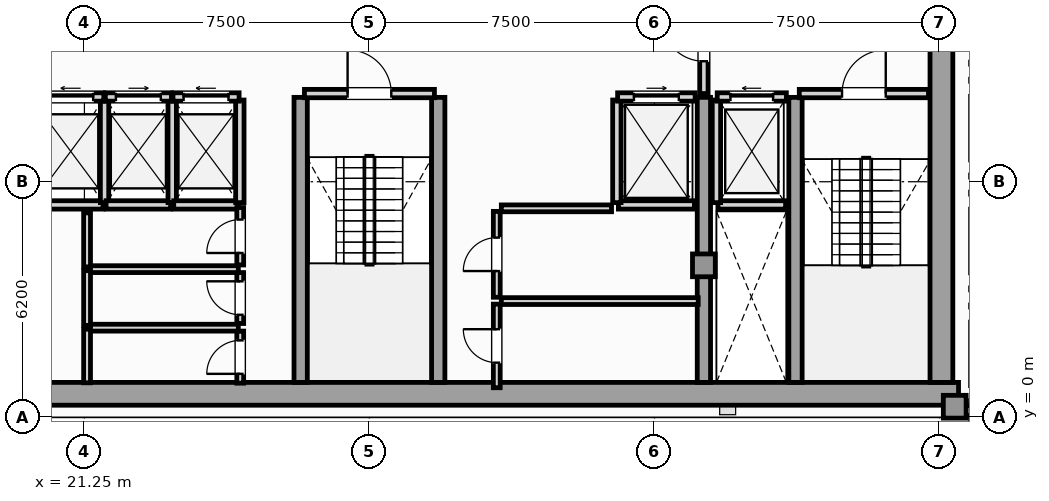
"""IFC4 building model, lengths in metres.
Left out: names, types, materials, properties, quantities, classifications, styles, units other than length and angle.
Written with IfcOpenShell. Run it as: python <this file> out.ifc"""

import sys

from ifc_helpers import new_model, si_unit, direction, frame, frame_2d, origin, origin_2d, place, context, subcontext, project, spatial, rectangle, extrude, element, fill, save


model = new_model("IFC4")
c1 = context("Model", 3, precision=1e-05, world=origin(), true_north=direction((0.0, 1.0)))
c2 = subcontext(c1, "Body", "Model", "MODEL_VIEW")
j1 = project(units=[si_unit("LENGTHUNIT", "METRE"), si_unit("PLANEANGLEUNIT", "RADIAN")], contexts=[c1])
p1 = place(None, origin())
s1 = spatial("IfcSite", under=j1, at=p1, CompositionType="ELEMENT")
p2 = place(p1, origin())
s2 = spatial("IfcBuilding", under=s1, at=p2, CompositionType="ELEMENT")
p3 = place(p2, frame((0.0, 0.0, 292.6)))
s3 = spatial("IfcBuildingStorey", under=s2, at=p3, CompositionType="ELEMENT", Elevation=292.6)
p4 = place(p3, frame((13.25, 0.62, 0.0), z_axis=(0.0, 0.0, 1.0), x_axis=(1.0, 0.0, 0.0)))
e1 = element("IfcWall", 1, at=p4, inside=s3, PredefinedType="SHEAR", context=c2, shape_type="SweptSolid", body=[
    extrude(rectangle(XDim=31.0, YDim=0.6, at=frame_2d((15.5, 0.0))), origin(), (0.0, 0.0, 1.0), 3.65),
])
p5 = place(p3, frame((43.8, 0.92, 0.0), z_axis=(0.0, 0.0, 1.0), x_axis=(0.0, 1.0, 0.0)))
e2 = element("IfcWall", 2, at=p5, inside=s3, PredefinedType="SHEAR", context=c2, shape_type="SweptSolid", body=[
    extrude(rectangle(XDim=10.53, YDim=0.6, at=frame_2d((5.265, 0.0))), origin(), (0.0, 0.0, 1.0), 3.65),
])
for number, where, z_axis, x_axis in (
    (3, (26.94, 0.92, 0.0), (0.0, 0.0, 1.0), (0.0, 1.0, 0.0)),
    (4, (30.56, 0.92, 0.0), (0.0, 0.0, 1.0), (0.0, 1.0, 0.0)),
    (5, (37.55, 0.92, 0.0), (0.0, 0.0, 1.0), (0.0, 1.0, 0.0)),
    (6, (39.96, 0.92, 0.0), (0.0, 0.0, 1.0), (0.0, 1.0, 0.0)),
):
    element("IfcWall", number, at=place(p3, frame(where, z_axis=z_axis, x_axis=x_axis)), inside=s3, PredefinedType="SHEAR", context=c2, shape_type="SweptSolid", body=[
        extrude(rectangle(XDim=7.5, YDim=0.35, at=frame_2d((3.75, 0.0))), origin(), (0.0, 0.0, 1.0), 3.65),
    ])
for number, where, z_axis, x_axis in (
    (7, (44.15, 0.28, 0.0), (0.0, 0.0, 1.0), (1.0, 0.0, 0.0)),
    (8, (37.55, 4.0, 0.0), (0.0, 0.0, 1.0), (1.0, 0.0, 0.0)),
):
    element("IfcColumn", number, at=place(p3, frame(where, z_axis=z_axis, x_axis=x_axis)), inside=s3, PredefinedType="COLUMN", context=c2, shape_type="SweptSolid", body=[
        extrude(rectangle(XDim=0.6, YDim=0.6, at=origin_2d()), origin(), (0.0, 0.0, 1.0), 3.85),
    ])
p6 = place(p3, frame((44.25, 0.18, 0.0), z_axis=(0.0, 0.0, 1.0), x_axis=(1.0, 0.0, 0.0)))
e9 = element("IfcWall", 9, at=p6, inside=s3, PredefinedType="SOLIDWALL", context=c2, shape_type="SweptSolid", body=[
    extrude(rectangle(XDim=1.444, YDim=0.26, at=frame_2d((0.722, 0.0))), origin(), (0.0, 0.0, 1.0), 3.65),
])
p7 = place(p3, frame((37.92, 5.59, 0.0), z_axis=(0.0, 0.0, 1.0), x_axis=(1.0, 0.0, 0.0)))
e10 = element("IfcWall", 10, at=p7, inside=s3, PredefinedType="SOLIDWALL", context=c2, shape_type="SweptSolid", body=[
    extrude(rectangle(XDim=1.78, YDim=0.22, at=frame_2d((0.89, 0.0))), origin(), (0.0, 0.0, 1.0), 3.65),
])
p8 = place(p3, frame((37.88, 5.65, 0.0), z_axis=(0.0, 0.0, 1.0), x_axis=(0.0, 1.0, 0.0)))
e11 = element("IfcWall", 11, at=p8, inside=s3, PredefinedType="SOLIDWALL", context=c2, shape_type="SweptSolid", body=[
    extrude(rectangle(XDim=2.7, YDim=0.22, at=frame_2d((1.35, 0.0))), origin(), (0.0, 0.0, 1.0), 3.65),
])
p9 = place(p3, frame((37.9, 8.43, 0.0), z_axis=(0.0, 0.0, 1.0), x_axis=(1.0, 0.0, 0.0)))
e12 = element("IfcWall", 12, at=p9, inside=s3, PredefinedType="SOLIDWALL", context=c2, shape_type="SweptSolid", body=[
    extrude(rectangle(XDim=1.82, YDim=0.22, at=frame_2d((0.91, 0.0))), origin(), (0.0, 0.0, 1.0), 3.65),
])
p10 = place(p9, frame((0.35, 0.0, 0.0)))
e13 = element("IfcOpeningElement", 13, at=p10, cuts=e12, PredefinedType="OPENING", context=c2, shape_type="SweptSolid", body=[
    extrude(rectangle(XDim=1.12, YDim=2.25, at=frame_2d((0.56, 1.125))), frame((0.0, 0.12, 0.0), z_axis=(0.0, -1.0, 0.0), x_axis=(1.0, 0.0, 0.0)), (0.0, 0.0, 1.0), 0.24),
])
p11 = place(p3, frame((35.3, 5.59, 0.0), z_axis=(0.0, 0.0, 1.0), x_axis=(1.0, 0.0, 0.0)))
e14 = element("IfcWall", 14, at=p11, inside=s3, PredefinedType="SOLIDWALL", context=c2, shape_type="SweptSolid", body=[
    extrude(rectangle(XDim=2.0, YDim=0.22, at=frame_2d((1.0, 0.0))), origin(), (0.0, 0.0, 1.0), 3.65),
])
p12 = place(p3, frame((35.26, 5.65, 0.0), z_axis=(0.0, 0.0, 1.0), x_axis=(0.0, 1.0, 0.0)))
e15 = element("IfcWall", 15, at=p12, inside=s3, PredefinedType="SOLIDWALL", context=c2, shape_type="SweptSolid", body=[
    extrude(rectangle(XDim=2.7, YDim=0.22, at=frame_2d((1.35, 0.0))), origin(), (0.0, 0.0, 1.0), 3.65),
])
p13 = place(p3, frame((35.28, 8.43, 0.0), z_axis=(0.0, 0.0, 1.0), x_axis=(1.0, 0.0, 0.0)))
e16 = element("IfcWall", 16, at=p13, inside=s3, PredefinedType="SOLIDWALL", context=c2, shape_type="SweptSolid", body=[
    extrude(rectangle(XDim=2.04, YDim=0.22, at=frame_2d((1.02, 0.0))), origin(), (0.0, 0.0, 1.0), 3.65),
])
p14 = place(p13, frame((0.43, 0.0, 0.0)))
e17 = element("IfcOpeningElement", 17, at=p14, cuts=e16, PredefinedType="OPENING", context=c2, shape_type="SweptSolid", body=[
    extrude(rectangle(XDim=1.18, YDim=2.2, at=frame_2d((0.59, 1.1))), frame((0.0, 0.12, 0.0), z_axis=(0.0, -1.0, 0.0), x_axis=(1.0, 0.0, 0.0)), (0.0, 0.0, 1.0), 0.24),
])
p15 = place(p3, frame((20.04, 5.59, 0.0), z_axis=(0.0, 0.0, 1.0), x_axis=(1.0, 0.0, 0.0)))
e18 = element("IfcWall", 18, at=p15, inside=s3, PredefinedType="SOLIDWALL", context=c2, shape_type="SweptSolid", body=[
    extrude(rectangle(XDim=1.7, YDim=0.22, at=frame_2d((0.85, 0.0))), origin(), (0.0, 0.0, 1.0), 3.65),
])
p16 = place(p3, frame((21.78, 5.65, 0.0), z_axis=(0.0, 0.0, 1.0), x_axis=(0.0, 1.0, 0.0)))
e19 = element("IfcWall", 19, at=p16, inside=s3, PredefinedType="SOLIDWALL", context=c2, shape_type="SweptSolid", body=[
    extrude(rectangle(XDim=2.7, YDim=0.22, at=frame_2d((1.35, 0.0))), origin(), (0.0, 0.0, 1.0), 3.65),
])
p17 = place(p3, frame((20.02, 8.43, 0.0), z_axis=(0.0, 0.0, 1.0), x_axis=(1.0, 0.0, 0.0)))
e20 = element("IfcWall", 20, at=p17, inside=s3, PredefinedType="SOLIDWALL", context=c2, shape_type="SweptSolid", body=[
    extrude(rectangle(XDim=1.74, YDim=0.22, at=frame_2d((0.87, 0.0))), origin(), (0.0, 0.0, 1.0), 3.65),
])
p18 = place(p17, frame((0.28, 0.0, 0.0)))
e21 = element("IfcOpeningElement", 21, at=p18, cuts=e20, PredefinedType="OPENING", context=c2, shape_type="SweptSolid", body=[
    extrude(rectangle(XDim=1.18, YDim=2.2, at=frame_2d((0.59, 1.1))), frame((0.0, 0.12, 0.0), z_axis=(0.0, -1.0, 0.0), x_axis=(1.0, 0.0, 0.0)), (0.0, 0.0, 1.0), 0.24),
])
p19 = place(p3, frame((21.82, 5.59, 0.0), z_axis=(0.0, 0.0, 1.0), x_axis=(1.0, 0.0, 0.0)))
e22 = element("IfcWall", 22, at=p19, inside=s3, PredefinedType="SOLIDWALL", context=c2, shape_type="SweptSolid", body=[
    extrude(rectangle(XDim=1.7, YDim=0.22, at=frame_2d((0.85, 0.0))), origin(), (0.0, 0.0, 1.0), 3.65),
])
p20 = place(p3, frame((23.56, 5.65, 0.0), z_axis=(0.0, 0.0, 1.0), x_axis=(0.0, 1.0, 0.0)))
e23 = element("IfcWall", 23, at=p20, inside=s3, PredefinedType="SOLIDWALL", context=c2, shape_type="SweptSolid", body=[
    extrude(rectangle(XDim=2.7, YDim=0.22, at=frame_2d((1.35, 0.0))), origin(), (0.0, 0.0, 1.0), 3.65),
])
p21 = place(p3, frame((21.8, 8.43, 0.0), z_axis=(0.0, 0.0, 1.0), x_axis=(1.0, 0.0, 0.0)))
e24 = element("IfcWall", 24, at=p21, inside=s3, PredefinedType="SOLIDWALL", context=c2, shape_type="SweptSolid", body=[
    extrude(rectangle(XDim=1.74, YDim=0.22, at=frame_2d((0.87, 0.0))), origin(), (0.0, 0.0, 1.0), 3.65),
])
p22 = place(p21, frame((0.28, 0.0, 0.0)))
e25 = element("IfcOpeningElement", 25, at=p22, cuts=e24, PredefinedType="OPENING", context=c2, shape_type="SweptSolid", body=[
    extrude(rectangle(XDim=1.18, YDim=2.2, at=frame_2d((0.59, 1.1))), frame((0.0, 0.12, 0.0), z_axis=(0.0, -1.0, 0.0), x_axis=(1.0, 0.0, 0.0)), (0.0, 0.0, 1.0), 0.24),
])
p23 = place(p3, frame((23.6, 5.59, 0.0), z_axis=(0.0, 0.0, 1.0), x_axis=(1.0, 0.0, 0.0)))
e26 = element("IfcWall", 26, at=p23, inside=s3, PredefinedType="SOLIDWALL", context=c2, shape_type="SweptSolid", body=[
    extrude(rectangle(XDim=1.7, YDim=0.22, at=frame_2d((0.85, 0.0))), origin(), (0.0, 0.0, 1.0), 3.65),
])
p24 = place(p3, frame((25.34, 5.65, 0.0), z_axis=(0.0, 0.0, 1.0), x_axis=(0.0, 1.0, 0.0)))
e27 = element("IfcWall", 27, at=p24, inside=s3, PredefinedType="SOLIDWALL", context=c2, shape_type="SweptSolid", body=[
    extrude(rectangle(XDim=2.7, YDim=0.22, at=frame_2d((1.35, 0.0))), origin(), (0.0, 0.0, 1.0), 3.65),
])
p25 = place(p3, frame((23.58, 8.43, 0.0), z_axis=(0.0, 0.0, 1.0), x_axis=(1.0, 0.0, 0.0)))
e28 = element("IfcWall", 28, at=p25, inside=s3, PredefinedType="SOLIDWALL", context=c2, shape_type="SweptSolid", body=[
    extrude(rectangle(XDim=1.74, YDim=0.22, at=frame_2d((0.87, 0.0))), origin(), (0.0, 0.0, 1.0), 3.65),
])
p26 = place(p25, frame((0.28, 0.0, 0.0)))
e29 = element("IfcOpeningElement", 29, at=p26, cuts=e28, PredefinedType="OPENING", context=c2, shape_type="SweptSolid", body=[
    extrude(rectangle(XDim=1.18, YDim=2.2, at=frame_2d((0.59, 1.1))), frame((0.0, 0.12, 0.0), z_axis=(0.0, -1.0, 0.0), x_axis=(1.0, 0.0, 0.0)), (0.0, 0.0, 1.0), 0.24),
])
p27 = place(p3, frame((40.06, 8.52, 0.0), z_axis=(0.0, 0.0, 1.0), x_axis=(1.0, 0.0, 0.0)))
e30 = element("IfcWall", 30, at=p27, inside=s3, PredefinedType="SOLIDWALL", context=c2, shape_type="SweptSolid", body=[
    extrude(rectangle(XDim=3.4, YDim=0.22, at=frame_2d((1.7, 0.0))), origin(), (0.0, 0.0, 1.0), 3.65),
])
p28 = place(p27, frame((1.125, 0.0, 0.0)))
e31 = element("IfcOpeningElement", 31, at=p28, cuts=e30, PredefinedType="OPENING", context=c2, shape_type="SweptSolid", body=[
    extrude(rectangle(XDim=1.15, YDim=2.2, at=frame_2d((0.575, 1.1))), frame((0.0, 0.12, 0.0), z_axis=(0.0, -1.0, 0.0), x_axis=(1.0, 0.0, 0.0)), (0.0, 0.0, 1.0), 0.24),
])
p29 = place(p3, frame((27.04, 8.52, 0.0), z_axis=(0.0, 0.0, 1.0), x_axis=(1.0, 0.0, 0.0)))
e32 = element("IfcWall", 32, at=p29, inside=s3, PredefinedType="SOLIDWALL", context=c2, shape_type="SweptSolid", body=[
    extrude(rectangle(XDim=3.42, YDim=0.22, at=frame_2d((1.71, 0.0))), origin(), (0.0, 0.0, 1.0), 3.65),
])
p30 = place(p29, frame((1.135, 0.0, 0.0)))
e33 = element("IfcOpeningElement", 33, at=p30, cuts=e32, PredefinedType="OPENING", context=c2, shape_type="SweptSolid", body=[
    extrude(rectangle(XDim=1.15, YDim=2.2, at=frame_2d((0.575, 1.1))), frame((0.0, 0.12, 0.0), z_axis=(0.0, -1.0, 0.0), x_axis=(1.0, 0.0, 0.0)), (0.0, 0.0, 1.0), 0.24),
])
p31 = place(p3, frame((37.55, 8.52, 0.0), z_axis=(0.0, 0.0, 1.0), x_axis=(0.0, 1.0, 0.0)))
e34 = element("IfcWall", 34, at=p31, inside=s3, PredefinedType="SOLIDWALL", context=c2, shape_type="SweptSolid", body=[
    extrude(rectangle(XDim=2.8, YDim=0.22, at=frame_2d((1.4, 0.0))), origin(), (0.0, 0.0, 1.0), 3.105),
])
p32 = place(p31, frame((0.85, 0.0, 0.0)))
e35 = element("IfcOpeningElement", 35, at=p32, cuts=e34, PredefinedType="OPENING", context=c2, shape_type="SweptSolid", body=[
    extrude(rectangle(XDim=1.1, YDim=2.2, at=frame_2d((0.55, 1.1))), frame((0.0, 0.12, 0.0), z_axis=(0.0, -1.0, 0.0), x_axis=(1.0, 0.0, 0.0)), (0.0, 0.0, 1.0), 0.24),
])
p33 = place(p3, frame((25.35, 0.9, 0.0), z_axis=(0.0, 0.0, 1.0), x_axis=(0.0, 1.0, 0.0)))
e36 = element("IfcWall", 36, at=p33, inside=s3, PredefinedType="PARTITIONING", context=c2, shape_type="SweptSolid", body=[
    extrude(rectangle(XDim=1.37, YDim=0.18, at=frame_2d((0.685, 0.0))), origin(), (0.0, 0.0, 1.0), 3.65),
])
p34 = place(p33, frame((0.245, 0.0, 0.0)))
e37 = element("IfcOpeningElement", 37, at=p34, cuts=e36, PredefinedType="OPENING", context=c2, shape_type="SweptSolid", body=[
    extrude(rectangle(XDim=0.88, YDim=2.05, at=frame_2d((0.44, 1.025))), frame((0.0, 0.1, 0.0), z_axis=(0.0, -1.0, 0.0), x_axis=(1.0, 0.0, 0.0)), (0.0, 0.0, 1.0), 0.2),
])
p35 = place(p3, frame((21.36, 2.36, 0.0), z_axis=(0.0, 0.0, 1.0), x_axis=(1.0, 0.0, 0.0)))
e38 = element("IfcWall", 38, at=p35, inside=s3, PredefinedType="PARTITIONING", context=c2, shape_type="SweptSolid", body=[
    extrude(rectangle(XDim=3.94, YDim=0.18, at=frame_2d((1.97, 0.0))), origin(), (0.0, 0.0, 1.0), 3.65),
])
p36 = place(p3, frame((21.32, 0.91, 0.0), z_axis=(0.0, 0.0, 1.0), x_axis=(0.0, 1.0, 0.0)))
e39 = element("IfcWall", 39, at=p36, inside=s3, PredefinedType="PARTITIONING", context=c2, shape_type="SweptSolid", body=[
    extrude(rectangle(XDim=1.41, YDim=0.18, at=frame_2d((0.705, 0.0))), origin(), (0.0, 0.0, 1.0), 3.65),
])
p37 = place(p3, frame((25.35, 2.47, 0.0), z_axis=(0.0, 0.0, 1.0), x_axis=(0.0, 1.0, 0.0)))
e40 = element("IfcWall", 40, at=p37, inside=s3, PredefinedType="PARTITIONING", context=c2, shape_type="SweptSolid", body=[
    extrude(rectangle(XDim=1.34, YDim=0.18, at=frame_2d((0.67, 0.0))), origin(), (0.0, 0.0, 1.0), 3.65),
])
p38 = place(p37, frame((0.23, 0.0, 0.0)))
e41 = element("IfcOpeningElement", 41, at=p38, cuts=e40, PredefinedType="OPENING", context=c2, shape_type="SweptSolid", body=[
    extrude(rectangle(XDim=0.88, YDim=2.05, at=frame_2d((0.44, 1.025))), frame((0.0, 0.1, 0.0), z_axis=(0.0, -1.0, 0.0), x_axis=(1.0, 0.0, 0.0)), (0.0, 0.0, 1.0), 0.2),
])
p39 = place(p3, frame((21.36, 3.9, 0.0), z_axis=(0.0, 0.0, 1.0), x_axis=(1.0, 0.0, 0.0)))
e42 = element("IfcWall", 42, at=p39, inside=s3, PredefinedType="PARTITIONING", context=c2, shape_type="SweptSolid", body=[
    extrude(rectangle(XDim=3.94, YDim=0.18, at=frame_2d((1.97, 0.0))), origin(), (0.0, 0.0, 1.0), 3.65),
])
p40 = place(p3, frame((21.32, 2.42, 0.0), z_axis=(0.0, 0.0, 1.0), x_axis=(0.0, 1.0, 0.0)))
e43 = element("IfcWall", 43, at=p40, inside=s3, PredefinedType="PARTITIONING", context=c2, shape_type="SweptSolid", body=[
    extrude(rectangle(XDim=1.44, YDim=0.18, at=frame_2d((0.72, 0.0))), origin(), (0.0, 0.0, 1.0), 3.65),
])
p41 = place(p3, frame((25.35, 4.01, 0.0), z_axis=(0.0, 0.0, 1.0), x_axis=(0.0, 1.0, 0.0)))
e44 = element("IfcWall", 44, at=p41, inside=s3, PredefinedType="PARTITIONING", context=c2, shape_type="SweptSolid", body=[
    extrude(rectangle(XDim=1.51, YDim=0.18, at=frame_2d((0.755, 0.0))), origin(), (0.0, 0.0, 1.0), 3.65),
])
p42 = place(p41, frame((0.315, 0.0, 0.0)))
e45 = element("IfcOpeningElement", 45, at=p42, cuts=e44, PredefinedType="OPENING", context=c2, shape_type="SweptSolid", body=[
    extrude(rectangle(XDim=0.88, YDim=2.05, at=frame_2d((0.44, 1.025))), frame((0.0, 0.1, 0.0), z_axis=(0.0, -1.0, 0.0), x_axis=(1.0, 0.0, 0.0)), (0.0, 0.0, 1.0), 0.2),
])
p43 = place(p3, frame((21.32, 3.96, 0.0), z_axis=(0.0, 0.0, 1.0), x_axis=(0.0, 1.0, 0.0)))
e46 = element("IfcWall", 46, at=p43, inside=s3, PredefinedType="PARTITIONING", context=c2, shape_type="SweptSolid", body=[
    extrude(rectangle(XDim=1.42, YDim=0.18, at=frame_2d((0.71, 0.0))), origin(), (0.0, 0.0, 1.0), 3.65),
])
p44 = place(p3, frame((32.1, 0.78, 0.0), z_axis=(0.0, 0.0, 1.0), x_axis=(0.0, 1.0, 0.0)))
e47 = element("IfcWall", 47, at=p44, inside=s3, PredefinedType="PARTITIONING", context=c2, shape_type="SweptSolid", body=[
    extrude(rectangle(XDim=2.2, YDim=0.18, at=frame_2d((1.1, 0.0))), origin(), (0.0, 0.0, 1.0), 3.65),
])
p45 = place(p44, frame((0.66, 0.0, 0.0)))
e48 = element("IfcOpeningElement", 48, at=p45, cuts=e47, PredefinedType="OPENING", context=c2, shape_type="SweptSolid", body=[
    extrude(rectangle(XDim=0.88, YDim=2.05, at=frame_2d((0.44, 1.025))), frame((0.0, 0.1, 0.0), z_axis=(0.0, -1.0, 0.0), x_axis=(1.0, 0.0, 0.0)), (0.0, 0.0, 1.0), 0.2),
])
p46 = place(p3, frame((32.22, 3.06, 0.0), z_axis=(0.0, 0.0, 1.0), x_axis=(1.0, 0.0, 0.0)))
e49 = element("IfcWall", 49, at=p46, inside=s3, PredefinedType="PARTITIONING", context=c2, shape_type="SweptSolid", body=[
    extrude(rectangle(XDim=5.18, YDim=0.18, at=frame_2d((2.59, 0.0))), origin(), (0.0, 0.0, 1.0), 3.65),
])
p47 = place(p3, frame((32.1, 3.16, 0.0), z_axis=(0.0, 0.0, 1.0), x_axis=(0.0, 1.0, 0.0)))
e50 = element("IfcWall", 50, at=p47, inside=s3, PredefinedType="PARTITIONING", context=c2, shape_type="SweptSolid", body=[
    extrude(rectangle(XDim=2.26, YDim=0.18, at=frame_2d((1.13, 0.0))), origin(), (0.0, 0.0, 1.0), 3.65),
])
p48 = place(p47, frame((0.69, 0.0, 0.0)))
e51 = element("IfcOpeningElement", 51, at=p48, cuts=e50, PredefinedType="OPENING", context=c2, shape_type="SweptSolid", body=[
    extrude(rectangle(XDim=0.88, YDim=2.05, at=frame_2d((0.44, 1.025))), frame((0.0, 0.1, 0.0), z_axis=(0.0, -1.0, 0.0), x_axis=(1.0, 0.0, 0.0)), (0.0, 0.0, 1.0), 0.2),
])
p49 = place(p3, frame((32.22, 5.5, 0.0), z_axis=(0.0, 0.0, 1.0), x_axis=(1.0, 0.0, 0.0)))
e52 = element("IfcWall", 52, at=p49, inside=s3, PredefinedType="PARTITIONING", context=c2, shape_type="SweptSolid", body=[
    extrude(rectangle(XDim=2.9, YDim=0.18, at=frame_2d((1.45, 0.0))), origin(), (0.0, 0.0, 1.0), 3.65),
])
p50 = place(p10, origin())
e53 = element("IfcDoor", 53, at=p50, inside=s3, OperationType="SLIDING_TO_LEFT", PredefinedType="DOOR", context=c2, shape_type="SweptSolid", body=[
    extrude(rectangle(XDim=1.12, YDim=2.25, at=frame_2d((0.56, 1.125))), frame((0.0, 0.025, 0.0), z_axis=(0.0, -1.0, 0.0), x_axis=(1.0, 0.0, 0.0)), (0.0, 0.0, 1.0), 0.05),
])
fill(e13, e53)
p51 = place(p14, origin())
e54 = element("IfcDoor", 54, at=p51, inside=s3, OperationType="SLIDING_TO_RIGHT", PredefinedType="DOOR", context=c2, shape_type="SweptSolid", body=[
    extrude(rectangle(XDim=1.18, YDim=2.2, at=frame_2d((0.59, 1.1))), frame((0.0, 0.025, 0.0), z_axis=(0.0, -1.0, 0.0), x_axis=(1.0, 0.0, 0.0)), (0.0, 0.0, 1.0), 0.05),
])
fill(e17, e54)
p52 = place(p18, origin())
e55 = element("IfcDoor", 55, at=p52, inside=s3, OperationType="SLIDING_TO_LEFT", PredefinedType="DOOR", context=c2, shape_type="SweptSolid", body=[
    extrude(rectangle(XDim=1.18, YDim=2.2, at=frame_2d((0.59, 1.1))), frame((0.0, 0.025, 0.0), z_axis=(0.0, -1.0, 0.0), x_axis=(1.0, 0.0, 0.0)), (0.0, 0.0, 1.0), 0.05),
])
fill(e21, e55)
p53 = place(p22, origin())
e56 = element("IfcDoor", 56, at=p53, inside=s3, OperationType="SLIDING_TO_RIGHT", PredefinedType="DOOR", context=c2, shape_type="SweptSolid", body=[
    extrude(rectangle(XDim=1.18, YDim=2.2, at=frame_2d((0.59, 1.1))), frame((0.0, 0.025, 0.0), z_axis=(0.0, -1.0, 0.0), x_axis=(1.0, 0.0, 0.0)), (0.0, 0.0, 1.0), 0.05),
])
fill(e25, e56)
p54 = place(p26, origin())
e57 = element("IfcDoor", 57, at=p54, inside=s3, OperationType="SLIDING_TO_LEFT", PredefinedType="DOOR", context=c2, shape_type="SweptSolid", body=[
    extrude(rectangle(XDim=1.18, YDim=2.2, at=frame_2d((0.59, 1.1))), frame((0.0, 0.025, 0.0), z_axis=(0.0, -1.0, 0.0), x_axis=(1.0, 0.0, 0.0)), (0.0, 0.0, 1.0), 0.05),
])
fill(e29, e57)
p55 = place(p28, origin())
e58 = element("IfcDoor", 58, at=p55, inside=s3, OperationType="SINGLE_SWING_RIGHT", PredefinedType="DOOR", context=c2, shape_type="SweptSolid", body=[
    extrude(rectangle(XDim=1.15, YDim=2.2, at=frame_2d((0.575, 1.1))), frame((0.0, 0.025, 0.0), z_axis=(0.0, -1.0, 0.0), x_axis=(1.0, 0.0, 0.0)), (0.0, 0.0, 1.0), 0.05),
])
fill(e31, e58)
p56 = place(p30, origin())
e59 = element("IfcDoor", 59, at=p56, inside=s3, OperationType="SINGLE_SWING_LEFT", PredefinedType="DOOR", context=c2, shape_type="SweptSolid", body=[
    extrude(rectangle(XDim=1.15, YDim=2.2, at=frame_2d((0.575, 1.1))), frame((0.0, 0.025, 0.0), z_axis=(0.0, -1.0, 0.0), x_axis=(1.0, 0.0, 0.0)), (0.0, 0.0, 1.0), 0.05),
])
fill(e33, e59)
p57 = place(p32, origin())
e60 = element("IfcDoor", 60, at=p57, inside=s3, OperationType="SINGLE_SWING_RIGHT", PredefinedType="DOOR", context=c2, shape_type="SweptSolid", body=[
    extrude(rectangle(XDim=1.1, YDim=2.2, at=frame_2d((0.55, 1.1))), frame((0.0, 0.025, 0.0), z_axis=(0.0, -1.0, 0.0), x_axis=(1.0, 0.0, 0.0)), (0.0, 0.0, 1.0), 0.05),
])
fill(e35, e60)
p58 = place(p34, origin())
e61 = element("IfcDoor", 61, at=p58, inside=s3, OperationType="SINGLE_SWING_LEFT", PredefinedType="DOOR", context=c2, shape_type="SweptSolid", body=[
    extrude(rectangle(XDim=0.88, YDim=2.05, at=frame_2d((0.44, 1.025))), frame((0.0, 0.025, 0.0), z_axis=(0.0, -1.0, 0.0), x_axis=(1.0, 0.0, 0.0)), (0.0, 0.0, 1.0), 0.05),
])
fill(e37, e61)
p59 = place(p38, origin())
e62 = element("IfcDoor", 62, at=p59, inside=s3, OperationType="SINGLE_SWING_RIGHT", PredefinedType="DOOR", context=c2, shape_type="SweptSolid", body=[
    extrude(rectangle(XDim=0.88, YDim=2.05, at=frame_2d((0.44, 1.025))), frame((0.0, 0.025, 0.0), z_axis=(0.0, -1.0, 0.0), x_axis=(1.0, 0.0, 0.0)), (0.0, 0.0, 1.0), 0.05),
])
fill(e41, e62)
p60 = place(p42, origin())
e63 = element("IfcDoor", 63, at=p60, inside=s3, OperationType="SINGLE_SWING_LEFT", PredefinedType="DOOR", context=c2, shape_type="SweptSolid", body=[
    extrude(rectangle(XDim=0.88, YDim=2.05, at=frame_2d((0.44, 1.025))), frame((0.0, 0.025, 0.0), z_axis=(0.0, -1.0, 0.0), x_axis=(1.0, 0.0, 0.0)), (0.0, 0.0, 1.0), 0.05),
])
fill(e45, e63)
p61 = place(p45, origin())
e64 = element("IfcDoor", 64, at=p61, inside=s3, OperationType="SINGLE_SWING_RIGHT", PredefinedType="DOOR", context=c2, shape_type="SweptSolid", body=[
    extrude(rectangle(XDim=0.88, YDim=2.05, at=frame_2d((0.44, 1.025))), frame((0.0, 0.025, 0.0), z_axis=(0.0, -1.0, 0.0), x_axis=(1.0, 0.0, 0.0)), (0.0, 0.0, 1.0), 0.05),
])
fill(e48, e64)
p62 = place(p48, origin())
e65 = element("IfcDoor", 65, at=p62, inside=s3, OperationType="SINGLE_SWING_LEFT", PredefinedType="DOOR", context=c2, shape_type="SweptSolid", body=[
    extrude(rectangle(XDim=0.88, YDim=2.05, at=frame_2d((0.44, 1.025))), frame((0.0, 0.025, 0.0), z_axis=(0.0, -1.0, 0.0), x_axis=(1.0, 0.0, 0.0)), (0.0, 0.0, 1.0), 0.05),
])
fill(e51, e65)
save(model, sys.argv[1])
